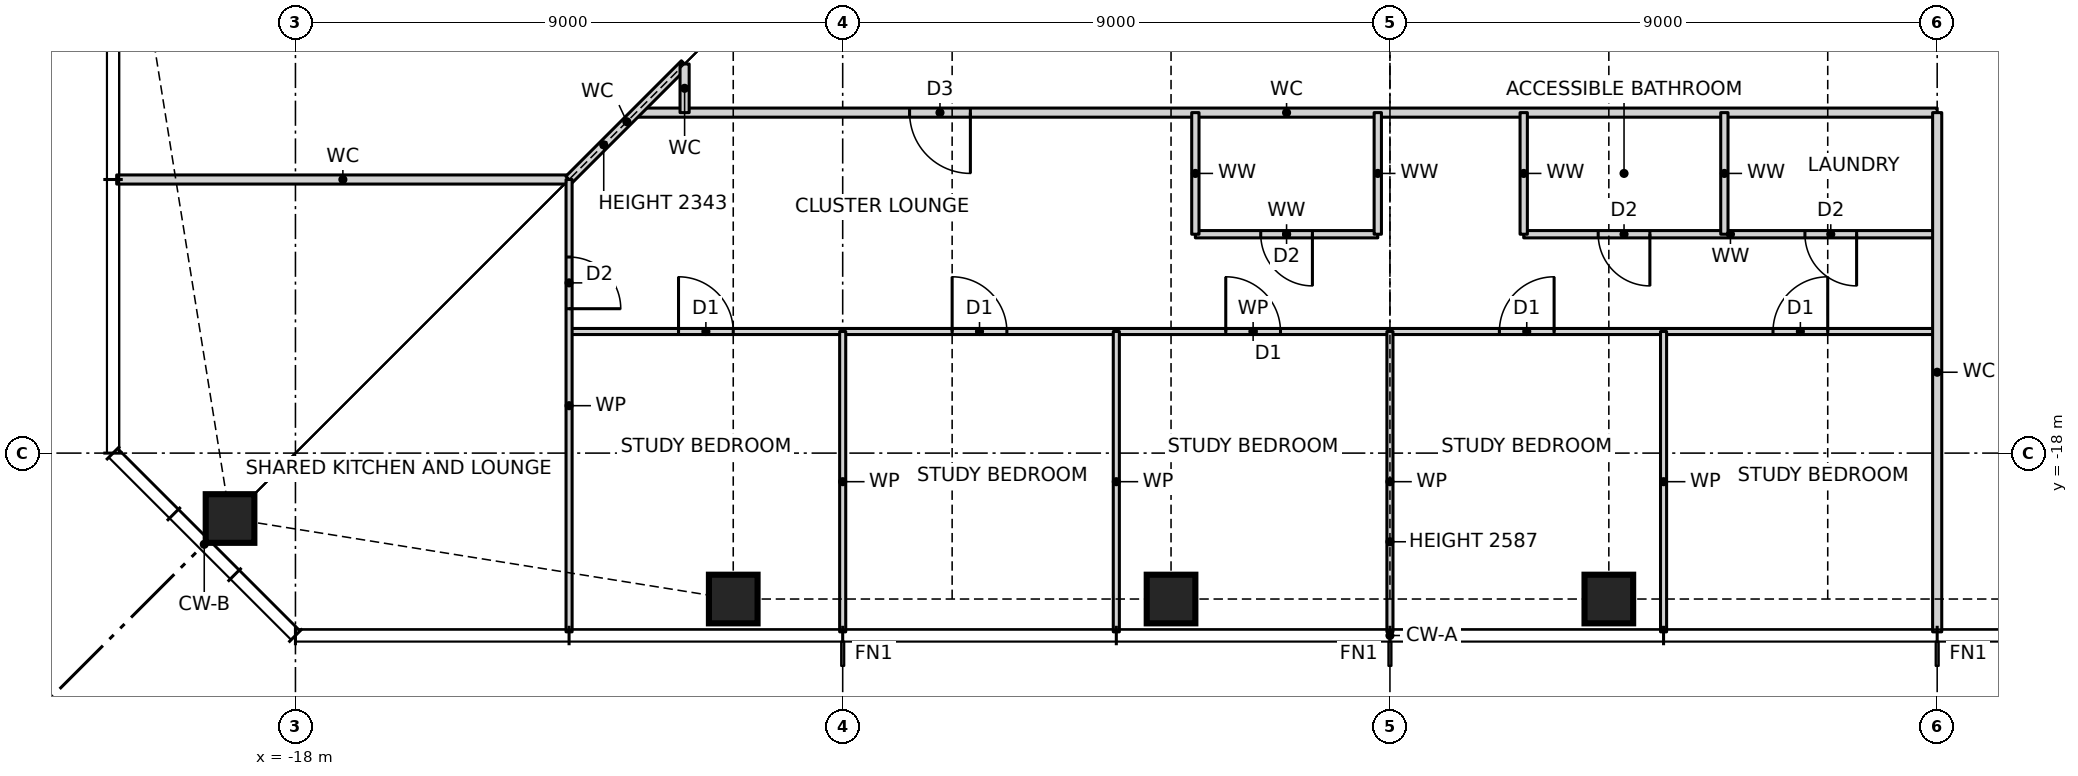
"""IFC4 building model, lengths in metres.
Left out: names, types, materials, properties, quantities, classifications, styles, units other than length and angle.
Written with IfcOpenShell. Run it as: python <this file> out.ifc"""

import sys

from ifc_helpers import new_model, si_unit, direction, frame, frame_2d, origin, origin_2d, place, context, subcontext, project, spatial, rectangle, hollow_rectangle, extrude, element, fill, save


model = new_model("IFC4")
c1 = context("Model", 3, precision=1e-05, world=origin(), true_north=direction((0.0, 1.0)))
c2 = subcontext(c1, "Body", "Model", "MODEL_VIEW")
j1 = project(units=[si_unit("LENGTHUNIT", "METRE"), si_unit("PLANEANGLEUNIT", "RADIAN")], contexts=[c1])
p1 = place(None, origin())
s1 = spatial("IfcSite", under=j1, at=p1, CompositionType="ELEMENT")
p2 = place(p1, origin())
s2 = spatial("IfcBuilding", under=s1, at=p2, CompositionType="ELEMENT")
p3 = place(p2, frame((0.0, 0.0, 129.5)))
s3 = spatial("IfcBuildingStorey", under=s2, at=p3, CompositionType="ELEMENT", Elevation=129.5)
for number, where, z_axis, x_axis in (
    (1, (-19.076, -19.076, 0.0), (0.0, 0.0, 1.0), (1.0, 0.0, 0.0)),
    (2, (-10.8, -20.4, 0.0), (0.0, 0.0, 1.0), (1.0, 0.0, 0.0)),
    (3, (-3.6, -20.4, 0.0), (0.0, 0.0, 1.0), (1.0, 0.0, 0.0)),
    (4, (3.6, -20.4, 0.0), (0.0, 0.0, 1.0), (1.0, 0.0, 0.0)),
):
    element("IfcColumn", number, at=place(p3, frame(where, z_axis=z_axis, x_axis=x_axis)), inside=s3, PredefinedType="COLUMN", context=c2, shape_type="SweptSolid", body=[
        extrude(hollow_rectangle(XDim=0.8, YDim=0.8, WallThickness=0.07, at=origin_2d()), origin(), (0.0, 0.0, 1.0), 3.5),
    ])
p4 = place(p3, frame((-13.5, -16.0, 0.0), z_axis=(0.0, 0.0, 1.0), x_axis=(1.0, 0.0, 0.0)))
e5 = element("IfcWall", 5, at=p4, inside=s3, PredefinedType="PARTITIONING", context=c2, shape_type="SweptSolid", body=[
    extrude(rectangle(XDim=22.5, YDim=0.1, at=frame_2d((11.25, 0.0))), origin(), (0.0, 0.0, 1.0), 3.27),
])
p5 = place(p4, frame((1.8, 0.0, 0.0)))
e6 = element("IfcOpeningElement", 6, at=p5, cuts=e5, PredefinedType="OPENING", context=c2, shape_type="SweptSolid", body=[
    extrude(rectangle(XDim=0.9, YDim=2.1, at=frame_2d((0.45, 1.05))), frame((0.0, 0.06, 0.0), z_axis=(0.0, -1.0, 0.0), x_axis=(1.0, 0.0, 0.0)), (0.0, 0.0, 1.0), 0.12),
])
p6 = place(p4, frame((6.3, 0.0, 0.0)))
e7 = element("IfcOpeningElement", 7, at=p6, cuts=e5, PredefinedType="OPENING", context=c2, shape_type="SweptSolid", body=[
    extrude(rectangle(XDim=0.9, YDim=2.1, at=frame_2d((0.45, 1.05))), frame((0.0, 0.06, 0.0), z_axis=(0.0, -1.0, 0.0), x_axis=(1.0, 0.0, 0.0)), (0.0, 0.0, 1.0), 0.12),
])
p7 = place(p4, frame((10.8, 0.0, 0.0)))
e8 = element("IfcOpeningElement", 8, at=p7, cuts=e5, PredefinedType="OPENING", context=c2, shape_type="SweptSolid", body=[
    extrude(rectangle(XDim=0.9, YDim=2.1, at=frame_2d((0.45, 1.05))), frame((0.0, 0.06, 0.0), z_axis=(0.0, -1.0, 0.0), x_axis=(1.0, 0.0, 0.0)), (0.0, 0.0, 1.0), 0.12),
])
p8 = place(p4, frame((15.3, 0.0, 0.0)))
e9 = element("IfcOpeningElement", 9, at=p8, cuts=e5, PredefinedType="OPENING", context=c2, shape_type="SweptSolid", body=[
    extrude(rectangle(XDim=0.9, YDim=2.1, at=frame_2d((0.45, 1.05))), frame((0.0, 0.06, 0.0), z_axis=(0.0, -1.0, 0.0), x_axis=(1.0, 0.0, 0.0)), (0.0, 0.0, 1.0), 0.12),
])
p9 = place(p4, frame((19.8, 0.0, 0.0)))
e10 = element("IfcOpeningElement", 10, at=p9, cuts=e5, PredefinedType="OPENING", context=c2, shape_type="SweptSolid", body=[
    extrude(rectangle(XDim=0.9, YDim=2.1, at=frame_2d((0.45, 1.05))), frame((0.0, 0.06, 0.0), z_axis=(0.0, -1.0, 0.0), x_axis=(1.0, 0.0, 0.0)), (0.0, 0.0, 1.0), 0.12),
])
p10 = place(p3, frame((-3.2, -14.4, 0.0), z_axis=(0.0, 0.0, 1.0), x_axis=(1.0, 0.0, 0.0)))
e11 = element("IfcWall", 11, at=p10, inside=s3, PredefinedType="PARTITIONING", context=c2, shape_type="SweptSolid", body=[
    extrude(rectangle(XDim=3.0, YDim=0.12, at=frame_2d((1.5, 0.0))), origin(), (0.0, 0.0, 1.0), 3.27),
])
p11 = place(p10, frame((1.075, 0.0, 0.0)))
e12 = element("IfcOpeningElement", 12, at=p11, cuts=e11, PredefinedType="OPENING", context=c2, shape_type="SweptSolid", body=[
    extrude(rectangle(XDim=0.85, YDim=2.1, at=frame_2d((0.425, 1.05))), frame((0.0, 0.07, 0.0), z_axis=(0.0, -1.0, 0.0), x_axis=(1.0, 0.0, 0.0)), (0.0, 0.0, 1.0), 0.14),
])
p12 = place(p3, frame((2.2, -14.4, 0.0), z_axis=(0.0, 0.0, 1.0), x_axis=(1.0, 0.0, 0.0)))
e13 = element("IfcWall", 13, at=p12, inside=s3, PredefinedType="PARTITIONING", context=c2, shape_type="SweptSolid", body=[
    extrude(rectangle(XDim=6.8, YDim=0.12, at=frame_2d((3.4, 0.0))), origin(), (0.0, 0.0, 1.0), 3.27),
])
p13 = place(p12, frame((1.225, 0.0, 0.0)))
e14 = element("IfcOpeningElement", 14, at=p13, cuts=e13, PredefinedType="OPENING", context=c2, shape_type="SweptSolid", body=[
    extrude(rectangle(XDim=0.85, YDim=2.1, at=frame_2d((0.425, 1.05))), frame((0.0, 0.07, 0.0), z_axis=(0.0, -1.0, 0.0), x_axis=(1.0, 0.0, 0.0)), (0.0, 0.0, 1.0), 0.14),
])
p14 = place(p12, frame((4.625, 0.0, 0.0)))
e15 = element("IfcOpeningElement", 15, at=p14, cuts=e13, PredefinedType="OPENING", context=c2, shape_type="SweptSolid", body=[
    extrude(rectangle(XDim=0.85, YDim=2.1, at=frame_2d((0.425, 1.05))), frame((0.0, 0.07, 0.0), z_axis=(0.0, -1.0, 0.0), x_axis=(1.0, 0.0, 0.0)), (0.0, 0.0, 1.0), 0.14),
])
p15 = place(p3, frame((-20.94, -13.5, 0.0), z_axis=(0.0, 0.0, 1.0), x_axis=(1.0, 0.0, 0.0)))
e16 = element("IfcWall", 16, at=p15, inside=s3, PredefinedType="PARTITIONING", context=c2, shape_type="SweptSolid", body=[
    extrude(rectangle(XDim=7.44, YDim=0.15, at=frame_2d((3.72, 0.0))), origin(), (0.0, 0.0, 1.0), 3.27),
])
p16 = place(p3, frame((-12.4, -12.4, 0.0), z_axis=(0.0, 0.0, 1.0), x_axis=(1.0, 0.0, 0.0)))
e17 = element("IfcWall", 17, at=p16, inside=s3, PredefinedType="PARTITIONING", context=c2, shape_type="SweptSolid", body=[
    extrude(rectangle(XDim=21.4, YDim=0.15, at=frame_2d((10.7, 0.0))), origin(), (0.0, 0.0, 1.0), 3.27),
])
p17 = place(p16, frame((4.5, 0.0, 0.0)))
e18 = element("IfcOpeningElement", 18, at=p17, cuts=e17, PredefinedType="OPENING", context=c2, shape_type="SweptSolid", body=[
    extrude(rectangle(XDim=1.0, YDim=2.1, at=frame_2d((0.5, 1.05))), frame((0.0, 0.085, 0.0), z_axis=(0.0, -1.0, 0.0), x_axis=(1.0, 0.0, 0.0)), (0.0, 0.0, 1.0), 0.17),
])
p18 = place(p3, frame((-13.5, -13.5, 0.0), z_axis=(0.0, 0.0, 1.0), x_axis=(0.707106781187, 0.707106781187, 0.0)))
e19 = element("IfcWall", 19, at=p18, inside=s3, PredefinedType="PARTITIONING", context=c2, shape_type="SweptSolid", body=[
    extrude(rectangle(XDim=2.687, YDim=0.15, at=frame_2d((1.343, 0.0))), origin(), (0.0, 0.0, 1.0), 2.343),
])
p19 = place(p3, frame((9.0, -20.94, 0.0), z_axis=(0.0, 0.0, 1.0), x_axis=(0.0, 1.0, 0.0)))
e20 = element("IfcWall", 20, at=p19, inside=s3, PredefinedType="PARTITIONING", context=c2, shape_type="SweptSolid", body=[
    extrude(rectangle(XDim=8.54, YDim=0.15, at=frame_2d((4.27, 0.0))), origin(), (0.0, 0.0, 1.0), 3.27),
])
p20 = place(p3, frame((5.5, -14.4, 0.0), z_axis=(0.0, 0.0, 1.0), x_axis=(0.0, 1.0, 0.0)))
e21 = element("IfcWall", 21, at=p20, inside=s3, PredefinedType="PARTITIONING", context=c2, shape_type="SweptSolid", body=[
    extrude(rectangle(XDim=2.0, YDim=0.12, at=frame_2d((1.0, 0.0))), origin(), (0.0, 0.0, 1.0), 3.27),
])
p21 = place(p3, frame((4.5, -20.94, 0.0), z_axis=(0.0, 0.0, 1.0), x_axis=(0.0, 1.0, 0.0)))
e22 = element("IfcWall", 22, at=p21, inside=s3, PredefinedType="PARTITIONING", context=c2, shape_type="SweptSolid", body=[
    extrude(rectangle(XDim=4.94, YDim=0.1, at=frame_2d((2.47, 0.0))), origin(), (0.0, 0.0, 1.0), 3.27),
])
p22 = place(p3, frame((2.2, -14.4, 0.0), z_axis=(0.0, 0.0, 1.0), x_axis=(0.0, 1.0, 0.0)))
e23 = element("IfcWall", 23, at=p22, inside=s3, PredefinedType="PARTITIONING", context=c2, shape_type="SweptSolid", body=[
    extrude(rectangle(XDim=2.0, YDim=0.12, at=frame_2d((1.0, 0.0))), origin(), (0.0, 0.0, 1.0), 3.27),
])
p23 = place(p3, frame((0.0, -20.94, 0.0), z_axis=(0.0, 0.0, 1.0), x_axis=(0.0, 1.0, 0.0)))
e24 = element("IfcWall", 24, at=p23, inside=s3, PredefinedType="PARTITIONING", context=c2, shape_type="SweptSolid", body=[
    extrude(rectangle(XDim=4.94, YDim=0.1, at=frame_2d((2.47, 0.0))), origin(), (0.0, 0.0, 1.0), 2.587),
])
for number, where, z_axis, x_axis in (
    (25, (-0.2, -14.4, 0.0), (0.0, 0.0, 1.0), (0.0, 1.0, 0.0)),
    (26, (-3.2, -14.4, 0.0), (0.0, 0.0, 1.0), (0.0, 1.0, 0.0)),
):
    element("IfcWall", number, at=place(p3, frame(where, z_axis=z_axis, x_axis=x_axis)), inside=s3, PredefinedType="PARTITIONING", context=c2, shape_type="SweptSolid", body=[
        extrude(rectangle(XDim=2.0, YDim=0.12, at=frame_2d((1.0, 0.0))), origin(), (0.0, 0.0, 1.0), 3.27),
    ])
for number, where, z_axis, x_axis in (
    (27, (-4.5, -20.94, 0.0), (0.0, 0.0, 1.0), (0.0, 1.0, 0.0)),
    (28, (-9.0, -20.94, 0.0), (0.0, 0.0, 1.0), (0.0, 1.0, 0.0)),
):
    element("IfcWall", number, at=place(p3, frame(where, z_axis=z_axis, x_axis=x_axis)), inside=s3, PredefinedType="PARTITIONING", context=c2, shape_type="SweptSolid", body=[
        extrude(rectangle(XDim=4.94, YDim=0.1, at=frame_2d((2.47, 0.0))), origin(), (0.0, 0.0, 1.0), 3.27),
    ])
p24 = place(p3, frame((-11.6, -12.4, 0.0), z_axis=(0.0, 0.0, 1.0), x_axis=(0.0, 1.0, 0.0)))
e29 = element("IfcWall", 29, at=p24, inside=s3, PredefinedType="PARTITIONING", context=c2, shape_type="SweptSolid", body=[
    extrude(rectangle(XDim=0.8, YDim=0.15, at=frame_2d((0.4, 0.0))), origin(), (0.0, 0.0, 1.0), 3.27),
])
p25 = place(p3, frame((-13.5, -20.94, 0.0), z_axis=(0.0, 0.0, 1.0), x_axis=(0.0, 1.0, 0.0)))
e30 = element("IfcWall", 30, at=p25, inside=s3, PredefinedType="PARTITIONING", context=c2, shape_type="SweptSolid", body=[
    extrude(rectangle(XDim=7.44, YDim=0.1, at=frame_2d((3.72, 0.0))), origin(), (0.0, 0.0, 1.0), 3.27),
])
p26 = place(p25, frame((5.315, 0.0, 0.0)))
e31 = element("IfcOpeningElement", 31, at=p26, cuts=e30, PredefinedType="OPENING", context=c2, shape_type="SweptSolid", body=[
    extrude(rectangle(XDim=0.85, YDim=2.1, at=frame_2d((0.425, 1.05))), frame((0.0, 0.06, 0.0), z_axis=(0.0, -1.0, 0.0), x_axis=(1.0, 0.0, 0.0)), (0.0, 0.0, 1.0), 0.12),
])
p27 = place(p5, origin())
e32 = element("IfcDoor", 32, at=p27, inside=s3, OperationType="SINGLE_SWING_LEFT", PredefinedType="DOOR", context=c2, shape_type="SweptSolid", body=[
    extrude(rectangle(XDim=0.9, YDim=2.1, at=frame_2d((0.45, 1.05))), frame((0.0, 0.025, 0.0), z_axis=(0.0, -1.0, 0.0), x_axis=(1.0, 0.0, 0.0)), (0.0, 0.0, 1.0), 0.05),
])
fill(e6, e32)
p28 = place(p6, origin())
e33 = element("IfcDoor", 33, at=p28, inside=s3, OperationType="SINGLE_SWING_LEFT", PredefinedType="DOOR", context=c2, shape_type="SweptSolid", body=[
    extrude(rectangle(XDim=0.9, YDim=2.1, at=frame_2d((0.45, 1.05))), frame((0.0, 0.025, 0.0), z_axis=(0.0, -1.0, 0.0), x_axis=(1.0, 0.0, 0.0)), (0.0, 0.0, 1.0), 0.05),
])
fill(e7, e33)
p29 = place(p7, origin())
e34 = element("IfcDoor", 34, at=p29, inside=s3, OperationType="SINGLE_SWING_LEFT", PredefinedType="DOOR", context=c2, shape_type="SweptSolid", body=[
    extrude(rectangle(XDim=0.9, YDim=2.1, at=frame_2d((0.45, 1.05))), frame((0.0, 0.025, 0.0), z_axis=(0.0, -1.0, 0.0), x_axis=(1.0, 0.0, 0.0)), (0.0, 0.0, 1.0), 0.05),
])
fill(e8, e34)
p30 = place(p8, origin())
e35 = element("IfcDoor", 35, at=p30, inside=s3, OperationType="SINGLE_SWING_RIGHT", PredefinedType="DOOR", context=c2, shape_type="SweptSolid", body=[
    extrude(rectangle(XDim=0.9, YDim=2.1, at=frame_2d((0.45, 1.05))), frame((0.0, 0.025, 0.0), z_axis=(0.0, -1.0, 0.0), x_axis=(1.0, 0.0, 0.0)), (0.0, 0.0, 1.0), 0.05),
])
fill(e9, e35)
p31 = place(p9, origin())
e36 = element("IfcDoor", 36, at=p31, inside=s3, OperationType="SINGLE_SWING_RIGHT", PredefinedType="DOOR", context=c2, shape_type="SweptSolid", body=[
    extrude(rectangle(XDim=0.9, YDim=2.1, at=frame_2d((0.45, 1.05))), frame((0.0, 0.025, 0.0), z_axis=(0.0, -1.0, 0.0), x_axis=(1.0, 0.0, 0.0)), (0.0, 0.0, 1.0), 0.05),
])
fill(e10, e36)
p32 = place(p17, frame((1.0, 0.0, 0.0), z_axis=(0.0, 0.0, 1.0), x_axis=(-1.0, 0.0, 0.0)))
e37 = element("IfcDoor", 37, at=p32, inside=s3, OperationType="SINGLE_SWING_LEFT", PredefinedType="DOOR", context=c2, shape_type="SweptSolid", body=[
    extrude(rectangle(XDim=1.0, YDim=2.1, at=frame_2d((0.5, 1.05))), frame((0.0, 0.025, 0.0), z_axis=(0.0, -1.0, 0.0), x_axis=(1.0, 0.0, 0.0)), (0.0, 0.0, 1.0), 0.05),
])
fill(e18, e37)
p33 = place(p11, frame((0.85, 0.0, 0.0), z_axis=(0.0, 0.0, 1.0), x_axis=(-1.0, 0.0, 0.0)))
e38 = element("IfcDoor", 38, at=p33, inside=s3, OperationType="SINGLE_SWING_LEFT", PredefinedType="DOOR", context=c2, shape_type="SweptSolid", body=[
    extrude(rectangle(XDim=0.85, YDim=2.1, at=frame_2d((0.425, 1.05))), frame((0.0, 0.025, 0.0), z_axis=(0.0, -1.0, 0.0), x_axis=(1.0, 0.0, 0.0)), (0.0, 0.0, 1.0), 0.05),
])
fill(e12, e38)
p34 = place(p13, frame((0.85, 0.0, 0.0), z_axis=(0.0, 0.0, 1.0), x_axis=(-1.0, 0.0, 0.0)))
e39 = element("IfcDoor", 39, at=p34, inside=s3, OperationType="SINGLE_SWING_LEFT", PredefinedType="DOOR", context=c2, shape_type="SweptSolid", body=[
    extrude(rectangle(XDim=0.85, YDim=2.1, at=frame_2d((0.425, 1.05))), frame((0.0, 0.025, 0.0), z_axis=(0.0, -1.0, 0.0), x_axis=(1.0, 0.0, 0.0)), (0.0, 0.0, 1.0), 0.05),
])
fill(e14, e39)
p35 = place(p14, frame((0.85, 0.0, 0.0), z_axis=(0.0, 0.0, 1.0), x_axis=(-1.0, 0.0, 0.0)))
e40 = element("IfcDoor", 40, at=p35, inside=s3, OperationType="SINGLE_SWING_LEFT", PredefinedType="DOOR", context=c2, shape_type="SweptSolid", body=[
    extrude(rectangle(XDim=0.85, YDim=2.1, at=frame_2d((0.425, 1.05))), frame((0.0, 0.025, 0.0), z_axis=(0.0, -1.0, 0.0), x_axis=(1.0, 0.0, 0.0)), (0.0, 0.0, 1.0), 0.05),
])
fill(e15, e40)
p36 = place(p26, frame((0.85, 0.0, 0.0), z_axis=(0.0, 0.0, 1.0), x_axis=(-1.0, 0.0, 0.0)))
e41 = element("IfcDoor", 41, at=p36, inside=s3, OperationType="SINGLE_SWING_RIGHT", PredefinedType="DOOR", context=c2, shape_type="SweptSolid", body=[
    extrude(rectangle(XDim=0.85, YDim=2.1, at=frame_2d((0.425, 1.05))), frame((0.0, 0.025, 0.0), z_axis=(0.0, -1.0, 0.0), x_axis=(1.0, 0.0, 0.0)), (0.0, 0.0, 1.0), 0.05),
])
fill(e31, e41)
save(model, sys.argv[1])
